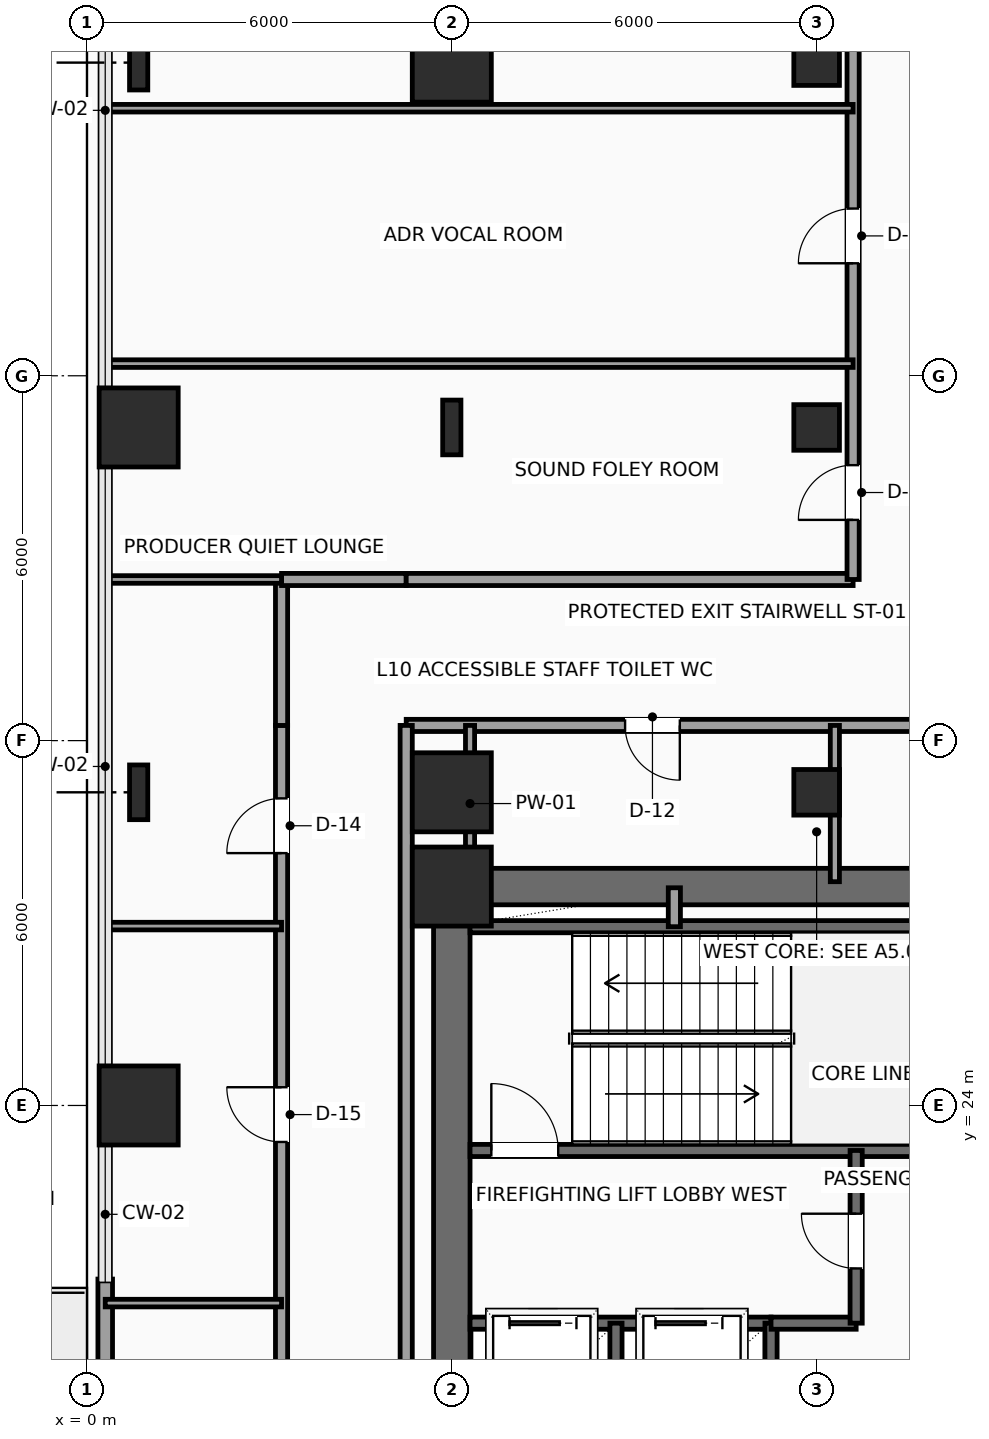
"""IFC4 building model, lengths in metres.
Left out: names, types, materials, properties, quantities, classifications, styles, units other than length and angle.
Written with IfcOpenShell. Run it as: python <this file> out.ifc"""

import sys

from ifc_helpers import new_model, si_unit, direction, frame, frame_2d, origin, origin_2d, place, context, subcontext, project, spatial, rectangle, hollow_rectangle, i_section, extrude, element, fill, save


model = new_model("IFC4")
c1 = context("Model", 3, precision=1e-05, world=origin(), true_north=direction((0.0, 1.0)))
c2 = subcontext(c1, "Body", "Model", "MODEL_VIEW")
j1 = project(units=[si_unit("LENGTHUNIT", "METRE"), si_unit("PLANEANGLEUNIT", "RADIAN")], contexts=[c1])
p1 = place(None, origin())
s1 = spatial("IfcSite", under=j1, at=p1, CompositionType="ELEMENT")
p2 = place(p1, origin())
s2 = spatial("IfcBuilding", under=s1, at=p2, CompositionType="ELEMENT")
p3 = place(p2, frame((0.0, 0.0, 48.0)))
s3 = spatial("IfcBuildingStorey", under=s2, at=p3, CompositionType="ELEMENT", Elevation=48.0)
for number, where, z_axis, x_axis in (
    (1, (6.0, 27.6, 0.0), (0.0, 0.0, 1.0), (1.0, 0.0, 0.0)),
    (2, (0.85, 24.0, 0.0), (0.0, 0.0, 1.0), (1.0, 0.0, 0.0)),
):
    element("IfcColumn", number, at=place(p3, frame(where, z_axis=z_axis, x_axis=x_axis)), inside=s3, PredefinedType="COLUMN", context=c2, shape_type="SweptSolid", body=[
        extrude(rectangle(XDim=1.3, YDim=1.3, at=origin_2d()), origin(), (0.0, 0.0, 1.0), 3.9),
    ])
p4 = place(p3, frame((0.85, 29.15, 0.0), z_axis=(0.0, 0.0, 1.0), x_axis=(1.0, 0.0, 0.0)))
e3 = element("IfcColumn", 3, at=p4, inside=s3, PredefinedType="COLUMN", context=c2, shape_type="SweptSolid", body=[
    extrude(i_section(OverallWidth=0.3, OverallDepth=0.9, WebThickness=0.019, FlangeThickness=0.035, FilletRadius=0.03, at=origin_2d()), origin(), (0.0, 0.0, 1.0), 3.9),
])
p5 = place(p3, frame((0.85, 35.15, 0.0), z_axis=(0.0, 0.0, 1.0), x_axis=(1.0, 0.0, 0.0)))
e4 = element("IfcColumn", 4, at=p5, inside=s3, PredefinedType="COLUMN", context=c2, shape_type="SweptSolid", body=[
    extrude(rectangle(XDim=1.3, YDim=1.3, at=origin_2d()), origin(), (0.0, 0.0, 1.0), 3.9),
])
p6 = place(p3, frame((0.85, 41.15, 0.0), z_axis=(0.0, 0.0, 1.0), x_axis=(1.0, 0.0, 0.0)))
e5 = element("IfcColumn", 5, at=p6, inside=s3, PredefinedType="COLUMN", context=c2, shape_type="SweptSolid", body=[
    extrude(i_section(OverallWidth=0.3, OverallDepth=0.9, WebThickness=0.019, FlangeThickness=0.035, FilletRadius=0.03, at=origin_2d()), origin(), (0.0, 0.0, 1.0), 3.9),
])
p7 = place(p3, frame((6.0, 29.15, 0.0), z_axis=(0.0, 0.0, 1.0), x_axis=(1.0, 0.0, 0.0)))
e6 = element("IfcColumn", 6, at=p7, inside=s3, PredefinedType="COLUMN", context=c2, shape_type="SweptSolid", body=[
    extrude(rectangle(XDim=1.3, YDim=1.3, at=origin_2d()), origin(), (0.0, 0.0, 1.0), 3.9),
])
p8 = place(p3, frame((6.0, 35.15, 0.0), z_axis=(0.0, 0.0, 1.0), x_axis=(1.0, 0.0, 0.0)))
e7 = element("IfcColumn", 7, at=p8, inside=s3, PredefinedType="COLUMN", context=c2, shape_type="SweptSolid", body=[
    extrude(i_section(OverallWidth=0.3, OverallDepth=0.9, WebThickness=0.019, FlangeThickness=0.035, FilletRadius=0.03, at=origin_2d()), origin(), (0.0, 0.0, 1.0), 3.9),
])
p9 = place(p3, frame((6.0, 41.15, 0.0), z_axis=(0.0, 0.0, 1.0), x_axis=(1.0, 0.0, 0.0)))
e8 = element("IfcColumn", 8, at=p9, inside=s3, PredefinedType="COLUMN", context=c2, shape_type="SweptSolid", body=[
    extrude(rectangle(XDim=1.3, YDim=1.3, at=origin_2d()), origin(), (0.0, 0.0, 1.0), 3.9),
])
for number, where, z_axis, x_axis in (
    (9, (12.0, 29.15, 0.0), (0.0, 0.0, 1.0), (1.0, 0.0, 0.0)),
    (10, (12.0, 35.15, 0.0), (0.0, 0.0, 1.0), (1.0, 0.0, 0.0)),
    (11, (12.0, 41.15, 0.0), (0.0, 0.0, 1.0), (1.0, 0.0, 0.0)),
):
    element("IfcColumn", number, at=place(p3, frame(where, z_axis=z_axis, x_axis=x_axis)), inside=s3, PredefinedType="COLUMN", context=c2, shape_type="SweptSolid", body=[
        extrude(hollow_rectangle(XDim=0.75, YDim=0.75, WallThickness=0.035, InnerFilletRadius=0.035, OuterFilletRadius=0.05, at=origin_2d()), origin(), (0.0, 0.0, 1.0), 3.9),
    ])
p10 = place(p3, frame((0.3, 11.855, 0.0), z_axis=(0.0, 0.0, 1.0), x_axis=(0.0, 1.0, 0.0)))
e12 = element("IfcWall", 12, at=p10, inside=s3, PredefinedType="SOLIDWALL", context=c2, shape_type="SweptSolid", body=[
    extrude(rectangle(XDim=9.29, YDim=0.24, at=frame_2d((4.645, 0.0))), origin(), (0.0, 0.0, 1.0), 3.65),
])
p11 = place(p10, frame((3.945, 0.0, 0.0)))
e13 = element("IfcOpeningElement", 13, at=p11, cuts=e12, PredefinedType="OPENING", context=c2, shape_type="SweptSolid", body=[
    extrude(rectangle(XDim=1.05, YDim=2.2, at=frame_2d((0.525, 1.1))), frame((0.0, 0.13, 0.0), z_axis=(0.0, -1.0, 0.0), x_axis=(1.0, 0.0, 0.0)), (0.0, 0.0, 1.0), 0.26),
])
p12 = place(p3, frame((6.0, 27.6, 0.0), z_axis=(0.0, 0.0, 1.0), x_axis=(1.0, 0.0, 0.0)))
e14 = element("IfcWall", 14, at=p12, inside=s3, PredefinedType="SHEAR", context=c2, shape_type="SweptSolid", body=[
    extrude(rectangle(XDim=12.0, YDim=0.6, at=frame_2d((6.0, 0.0))), origin(), (0.0, 0.0, 1.0), 3.65),
])
p13 = place(p12, frame((10.2, 0.0, 0.0)))
e15 = element("IfcOpeningElement", 15, at=p13, cuts=e14, PredefinedType="OPENING", context=c2, shape_type="SweptSolid", body=[
    extrude(rectangle(XDim=0.9, YDim=2.15, at=frame_2d((0.45, 1.075))), frame((0.0, 0.31, 0.0), z_axis=(0.0, -1.0, 0.0), x_axis=(1.0, 0.0, 0.0)), (0.0, 0.0, 1.0), 0.62),
])
p14 = place(p3, frame((6.0, 18.0, 0.0), z_axis=(0.0, 0.0, 1.0), x_axis=(0.0, 1.0, 0.0)))
e16 = element("IfcWall", 16, at=p14, inside=s3, PredefinedType="SHEAR", context=c2, shape_type="SweptSolid", body=[
    extrude(rectangle(XDim=9.6, YDim=0.6, at=frame_2d((4.8, 0.0))), origin(), (0.0, 0.0, 1.0), 3.65),
])
p15 = place(p3, frame((6.3, 23.26, 0.0), z_axis=(0.0, 0.0, 1.0), x_axis=(1.0, 0.0, 0.0)))
e17 = element("IfcWall", 17, at=p15, inside=s3, PredefinedType="SHEAR", context=c2, shape_type="SweptSolid", body=[
    extrude(rectangle(XDim=8.88, YDim=0.2, at=frame_2d((4.44, 0.0))), origin(), (0.0, 0.0, 1.0), 3.65),
])
p16 = place(p15, frame((0.35, 0.0, 0.0)))
e18 = element("IfcOpeningElement", 18, at=p16, cuts=e17, PredefinedType="OPENING", context=c2, shape_type="SweptSolid", body=[
    extrude(rectangle(XDim=1.1, YDim=2.2, at=frame_2d((0.55, 1.1))), frame((0.0, 0.11, 0.0), z_axis=(0.0, -1.0, 0.0), x_axis=(1.0, 0.0, 0.0)), (0.0, 0.0, 1.0), 0.22),
])
p17 = place(p3, frame((6.3, 26.94, 0.0), z_axis=(0.0, 0.0, 1.0), x_axis=(1.0, 0.0, 0.0)))
e19 = element("IfcWall", 19, at=p17, inside=s3, PredefinedType="SHEAR", context=c2, shape_type="SweptSolid", body=[
    extrude(rectangle(XDim=8.88, YDim=0.2, at=frame_2d((4.44, 0.0))), origin(), (0.0, 0.0, 1.0), 3.65),
])
p18 = place(p3, frame((6.3, 20.42, 0.0), z_axis=(0.0, 0.0, 1.0), x_axis=(1.0, 0.0, 0.0)))
e20 = element("IfcWall", 20, at=p18, inside=s3, PredefinedType="SHEAR", context=c2, shape_type="SweptSolid", body=[
    extrude(rectangle(XDim=4.95, YDim=0.2, at=frame_2d((2.475, 0.0))), origin(), (0.0, 0.0, 1.0), 3.65),
])
p19 = place(p18, frame((0.65, 0.0, 0.0)))
e21 = element("IfcOpeningElement", 21, at=p19, cuts=e20, PredefinedType="OPENING", context=c2, shape_type="SweptSolid", body=[
    extrude(rectangle(XDim=1.1, YDim=2.2, at=frame_2d((0.55, 1.1))), frame((0.0, 0.11, 0.0), z_axis=(0.0, -1.0, 0.0), x_axis=(1.0, 0.0, 0.0)), (0.0, 0.0, 1.0), 0.22),
])
p20 = place(p18, frame((3.05, 0.0, 0.0)))
e22 = element("IfcOpeningElement", 22, at=p20, cuts=e20, PredefinedType="OPENING", context=c2, shape_type="SweptSolid", body=[
    extrude(rectangle(XDim=1.1, YDim=2.2, at=frame_2d((0.55, 1.1))), frame((0.0, 0.11, 0.0), z_axis=(0.0, -1.0, 0.0), x_axis=(1.0, 0.0, 0.0)), (0.0, 0.0, 1.0), 0.22),
])
for number, where, z_axis, x_axis in (
    (23, (8.7, 18.25, 0.0), (0.0, 0.0, 1.0), (0.0, 1.0, 0.0)),
    (24, (11.25, 18.25, 0.0), (0.0, 0.0, 1.0), (0.0, 1.0, 0.0)),
):
    element("IfcWall", number, at=place(p3, frame(where, z_axis=z_axis, x_axis=x_axis)), inside=s3, PredefinedType="SHEAR", context=c2, shape_type="SweptSolid", body=[
        extrude(rectangle(XDim=2.17, YDim=0.2, at=frame_2d((1.085, 0.0))), origin(), (0.0, 0.0, 1.0), 3.65),
    ])
p21 = place(p3, frame((11.25, 20.42, 0.0), z_axis=(0.0, 0.0, 1.0), x_axis=(1.0, 0.0, 0.0)))
e25 = element("IfcWall", 25, at=p21, inside=s3, PredefinedType="SHEAR", context=c2, shape_type="SweptSolid", body=[
    extrude(rectangle(XDim=1.4, YDim=0.2, at=frame_2d((0.7, 0.0))), origin(), (0.0, 0.0, 1.0), 3.65),
])
p22 = place(p3, frame((12.65, 20.42, 0.0), z_axis=(0.0, 0.0, 1.0), x_axis=(0.0, 1.0, 0.0)))
e26 = element("IfcWall", 26, at=p22, inside=s3, PredefinedType="SHEAR", context=c2, shape_type="SweptSolid", body=[
    extrude(rectangle(XDim=2.84, YDim=0.2, at=frame_2d((1.42, 0.0))), origin(), (0.0, 0.0, 1.0), 3.65),
])
p23 = place(p22, frame((0.9, 0.0, 0.0)))
e27 = element("IfcOpeningElement", 27, at=p23, cuts=e26, PredefinedType="OPENING", context=c2, shape_type="SweptSolid", body=[
    extrude(rectangle(XDim=0.9, YDim=2.15, at=frame_2d((0.45, 1.075))), frame((0.0, 0.11, 0.0), z_axis=(0.0, -1.0, 0.0), x_axis=(1.0, 0.0, 0.0)), (0.0, 0.0, 1.0), 0.22),
])
p24 = place(p3, frame((9.66, 26.94, 0.0), z_axis=(0.0, 0.0, 1.0), x_axis=(0.0, 1.0, 0.0)))
e28 = element("IfcWall", 28, at=p24, inside=s3, PredefinedType="SOLIDWALL", context=c2, shape_type="SweptSolid", body=[
    extrude(rectangle(XDim=0.64, YDim=0.2, at=frame_2d((0.32, 0.0))), origin(), (0.0, 0.0, 1.0), 3.65),
])
p25 = place(p3, frame((3.2, 14.55, 0.0), z_axis=(0.0, 0.0, 1.0), x_axis=(0.0, 1.0, 0.0)))
e29 = element("IfcWall", 29, at=p25, inside=s3, PredefinedType="PARTITIONING", context=c2, shape_type="SweptSolid", body=[
    extrude(rectangle(XDim=15.7, YDim=0.2, at=frame_2d((7.85, 0.0))), origin(), (0.0, 0.0, 1.0), 3.65),
])
p26 = place(p25, frame((2.65, 0.0, 0.0)))
e30 = element("IfcOpeningElement", 30, at=p26, cuts=e29, PredefinedType="OPENING", context=c2, shape_type="SweptSolid", body=[
    extrude(rectangle(XDim=0.9, YDim=2.1, at=frame_2d((0.45, 1.05))), frame((0.0, 0.11, 0.0), z_axis=(0.0, -1.0, 0.0), x_axis=(1.0, 0.0, 0.0)), (0.0, 0.0, 1.0), 0.22),
])
p27 = place(p25, frame((8.85, 0.0, 0.0)))
e31 = element("IfcOpeningElement", 31, at=p27, cuts=e29, PredefinedType="OPENING", context=c2, shape_type="SweptSolid", body=[
    extrude(rectangle(XDim=0.9, YDim=2.1, at=frame_2d((0.45, 1.05))), frame((0.0, 0.11, 0.0), z_axis=(0.0, -1.0, 0.0), x_axis=(1.0, 0.0, 0.0)), (0.0, 0.0, 1.0), 0.22),
])
p28 = place(p25, frame((13.6, 0.0, 0.0)))
e32 = element("IfcOpeningElement", 32, at=p28, cuts=e29, PredefinedType="OPENING", context=c2, shape_type="SweptSolid", body=[
    extrude(rectangle(XDim=0.9, YDim=2.1, at=frame_2d((0.45, 1.05))), frame((0.0, 0.11, 0.0), z_axis=(0.0, -1.0, 0.0), x_axis=(1.0, 0.0, 0.0)), (0.0, 0.0, 1.0), 0.22),
])
p29 = place(p3, frame((3.2, 30.25, 0.0), z_axis=(0.0, 0.0, 1.0), x_axis=(0.0, 1.0, 0.0)))
e33 = element("IfcWall", 33, at=p29, inside=s3, PredefinedType="PARTITIONING", context=c2, shape_type="SweptSolid", body=[
    extrude(rectangle(XDim=2.4, YDim=0.2, at=frame_2d((1.2, 0.0))), origin(), (0.0, 0.0, 1.0), 3.65),
])
p30 = place(p3, frame((3.2, 32.65, 0.0), z_axis=(0.0, 0.0, 1.0), x_axis=(1.0, 0.0, 0.0)))
e34 = element("IfcWall", 34, at=p30, inside=s3, PredefinedType="PARTITIONING", context=c2, shape_type="SweptSolid", body=[
    extrude(rectangle(XDim=2.05, YDim=0.2, at=frame_2d((1.025, 0.0))), origin(), (0.0, 0.0, 1.0), 3.65),
])
p31 = place(p3, frame((5.25, 32.65, 0.0), z_axis=(0.0, 0.0, 1.0), x_axis=(1.0, 0.0, 0.0)))
e35 = element("IfcWall", 35, at=p31, inside=s3, PredefinedType="PARTITIONING", context=c2, shape_type="SweptSolid", body=[
    extrude(rectangle(XDim=7.35, YDim=0.2, at=frame_2d((3.675, 0.0))), origin(), (0.0, 0.0, 1.0), 3.65),
])
p32 = place(p3, frame((12.6, 32.65, 0.0), z_axis=(0.0, 0.0, 1.0), x_axis=(0.0, 1.0, 0.0)))
e36 = element("IfcWall", 36, at=p32, inside=s3, PredefinedType="PARTITIONING", context=c2, shape_type="SweptSolid", body=[
    extrude(rectangle(XDim=12.25, YDim=0.2, at=frame_2d((6.125, 0.0))), origin(), (0.0, 0.0, 1.0), 3.65),
])
p33 = place(p32, frame((0.98, 0.0, 0.0)))
e37 = element("IfcOpeningElement", 37, at=p33, cuts=e36, PredefinedType="OPENING", context=c2, shape_type="SweptSolid", body=[
    extrude(rectangle(XDim=0.9, YDim=2.1, at=frame_2d((0.45, 1.05))), frame((0.0, 0.11, 0.0), z_axis=(0.0, -1.0, 0.0), x_axis=(1.0, 0.0, 0.0)), (0.0, 0.0, 1.0), 0.22),
])
p34 = place(p32, frame((5.2, 0.0, 0.0)))
e38 = element("IfcOpeningElement", 38, at=p34, cuts=e36, PredefinedType="OPENING", context=c2, shape_type="SweptSolid", body=[
    extrude(rectangle(XDim=0.9, YDim=2.1, at=frame_2d((0.45, 1.05))), frame((0.0, 0.11, 0.0), z_axis=(0.0, -1.0, 0.0), x_axis=(1.0, 0.0, 0.0)), (0.0, 0.0, 1.0), 0.22),
])
p35 = place(p32, frame((9.55, 0.0, 0.0)))
e39 = element("IfcOpeningElement", 39, at=p35, cuts=e36, PredefinedType="OPENING", context=c2, shape_type="SweptSolid", body=[
    extrude(rectangle(XDim=0.9, YDim=2.1, at=frame_2d((0.45, 1.05))), frame((0.0, 0.11, 0.0), z_axis=(0.0, -1.0, 0.0), x_axis=(1.0, 0.0, 0.0)), (0.0, 0.0, 1.0), 0.22),
])
p36 = place(p3, frame((15.88, 30.25, 0.0), z_axis=(0.0, 0.0, 1.0), x_axis=(-1.0, 0.0, 0.0)))
e40 = element("IfcWall", 40, at=p36, inside=s3, PredefinedType="PARTITIONING", context=c2, shape_type="SweptSolid", body=[
    extrude(rectangle(XDim=10.63, YDim=0.2, at=frame_2d((5.315, 0.0))), origin(), (0.0, 0.0, 1.0), 3.65),
])
p37 = place(p36, frame((6.13, 0.0, 0.0)))
e41 = element("IfcOpeningElement", 41, at=p37, cuts=e40, PredefinedType="OPENING", context=c2, shape_type="SweptSolid", body=[
    extrude(rectangle(XDim=0.9, YDim=2.1, at=frame_2d((0.45, 1.05))), frame((0.0, 0.11, 0.0), z_axis=(0.0, -1.0, 0.0), x_axis=(1.0, 0.0, 0.0)), (0.0, 0.0, 1.0), 0.22),
])
p38 = place(p3, frame((5.25, 30.25, 0.0), z_axis=(0.0, 0.0, 1.0), x_axis=(0.0, -1.0, 0.0)))
e42 = element("IfcWall", 42, at=p38, inside=s3, PredefinedType="PARTITIONING", context=c2, shape_type="SweptSolid", body=[
    extrude(rectangle(XDim=13.35, YDim=0.2, at=frame_2d((6.675, 0.0))), origin(), (0.0, 0.0, 1.0), 3.65),
])
for number, where, z_axis, x_axis in (
    (43, (6.3, 27.68, 0.0), (0.0, 0.0, 1.0), (0.0, 1.0, 0.0)),
    (44, (12.3, 27.68, 0.0), (0.0, 0.0, 1.0), (0.0, 1.0, 0.0)),
):
    element("IfcWall", number, at=place(p3, frame(where, z_axis=z_axis, x_axis=x_axis)), inside=s3, PredefinedType="PARTITIONING", context=c2, shape_type="SweptSolid", body=[
        extrude(rectangle(XDim=2.57, YDim=0.15, at=frame_2d((1.285, 0.0))), origin(), (0.0, 0.0, 1.0), 2.992),
    ])
for number, where, z_axis, x_axis in (
    (45, (0.3, 36.2, 0.0), (0.0, 0.0, 1.0), (1.0, 0.0, 0.0)),
    (46, (0.3, 40.4, 0.0), (0.0, 0.0, 1.0), (1.0, 0.0, 0.0)),
):
    element("IfcWall", number, at=place(p3, frame(where, z_axis=z_axis, x_axis=x_axis)), inside=s3, PredefinedType="PARTITIONING", context=c2, shape_type="SweptSolid", body=[
        extrude(rectangle(XDim=12.3, YDim=0.125, at=frame_2d((6.15, 0.0))), origin(), (0.0, 0.0, 1.0), 3.65),
    ])
p39 = place(p3, frame((0.3, 40.4, 0.0), z_axis=(0.0, 0.0, 1.0), x_axis=(0.006903122154, 0.999976173168, 0.0)))
e47 = element("IfcWall", 47, at=p39, inside=s3, PredefinedType="PARTITIONING", context=c2, shape_type="SweptSolid", body=[
    extrude(rectangle(XDim=7.25, YDim=0.125, at=frame_2d((3.625, 0.0))), origin(), (0.0, 0.0, 1.0), 3.65),
])
for number, where, z_axis, x_axis in (
    (48, (0.3, 20.75, 0.0), (0.0, 0.0, 1.0), (1.0, 0.0, 0.0)),
    (49, (0.3, 26.95, 0.0), (0.0, 0.0, 1.0), (1.0, 0.0, 0.0)),
    (50, (0.3, 32.65, 0.0), (0.0, 0.0, 1.0), (1.0, 0.0, 0.0)),
):
    element("IfcWall", number, at=place(p3, frame(where, z_axis=z_axis, x_axis=x_axis)), inside=s3, PredefinedType="PARTITIONING", context=c2, shape_type="SweptSolid", body=[
        extrude(rectangle(XDim=2.9, YDim=0.125, at=frame_2d((1.45, 0.0))), origin(), (0.0, 0.0, 1.0), 3.65),
    ])
p40 = place(p16, origin())
e51 = element("IfcDoor", 51, at=p40, inside=s3, OperationType="SINGLE_SWING_LEFT", PredefinedType="DOOR", context=c2, shape_type="SweptSolid", body=[
    extrude(rectangle(XDim=1.1, YDim=2.2, at=frame_2d((0.55, 1.1))), frame((0.0, 0.025, 0.0), z_axis=(0.0, -1.0, 0.0), x_axis=(1.0, 0.0, 0.0)), (0.0, 0.0, 1.0), 0.05),
])
fill(e18, e51)
p41 = place(p19, origin())
e52 = element("IfcDoor", 52, at=p41, inside=s3, OperationType="SLIDING_TO_LEFT", PredefinedType="DOOR", context=c2, shape_type="SweptSolid", body=[
    extrude(rectangle(XDim=1.1, YDim=2.2, at=frame_2d((0.55, 1.1))), frame((0.0, 0.025, 0.0), z_axis=(0.0, -1.0, 0.0), x_axis=(1.0, 0.0, 0.0)), (0.0, 0.0, 1.0), 0.05),
])
fill(e21, e52)
p42 = place(p20, origin())
e53 = element("IfcDoor", 53, at=p42, inside=s3, OperationType="SLIDING_TO_LEFT", PredefinedType="DOOR", context=c2, shape_type="SweptSolid", body=[
    extrude(rectangle(XDim=1.1, YDim=2.2, at=frame_2d((0.55, 1.1))), frame((0.0, 0.025, 0.0), z_axis=(0.0, -1.0, 0.0), x_axis=(1.0, 0.0, 0.0)), (0.0, 0.0, 1.0), 0.05),
])
fill(e22, e53)
p43 = place(p23, origin())
e54 = element("IfcDoor", 54, at=p43, inside=s3, OperationType="SINGLE_SWING_RIGHT", PredefinedType="DOOR", context=c2, shape_type="SweptSolid", body=[
    extrude(rectangle(XDim=0.9, YDim=2.15, at=frame_2d((0.45, 1.075))), frame((0.0, 0.025, 0.0), z_axis=(0.0, -1.0, 0.0), x_axis=(1.0, 0.0, 0.0)), (0.0, 0.0, 1.0), 0.05),
])
fill(e27, e54)
p44 = place(p27, origin())
e55 = element("IfcDoor", 55, at=p44, inside=s3, OperationType="SINGLE_SWING_RIGHT", PredefinedType="DOOR", context=c2, shape_type="SweptSolid", body=[
    extrude(rectangle(XDim=0.9, YDim=2.1, at=frame_2d((0.45, 1.05))), frame((0.0, 0.025, 0.0), z_axis=(0.0, -1.0, 0.0), x_axis=(1.0, 0.0, 0.0)), (0.0, 0.0, 1.0), 0.05),
])
fill(e31, e55)
p45 = place(p28, origin())
e56 = element("IfcDoor", 56, at=p45, inside=s3, OperationType="SINGLE_SWING_LEFT", PredefinedType="DOOR", context=c2, shape_type="SweptSolid", body=[
    extrude(rectangle(XDim=0.9, YDim=2.1, at=frame_2d((0.45, 1.05))), frame((0.0, 0.025, 0.0), z_axis=(0.0, -1.0, 0.0), x_axis=(1.0, 0.0, 0.0)), (0.0, 0.0, 1.0), 0.05),
])
fill(e32, e56)
p46 = place(p33, origin())
e57 = element("IfcDoor", 57, at=p46, inside=s3, OperationType="SINGLE_SWING_LEFT", PredefinedType="DOOR", context=c2, shape_type="SweptSolid", body=[
    extrude(rectangle(XDim=0.9, YDim=2.1, at=frame_2d((0.45, 1.05))), frame((0.0, 0.025, 0.0), z_axis=(0.0, -1.0, 0.0), x_axis=(1.0, 0.0, 0.0)), (0.0, 0.0, 1.0), 0.05),
])
fill(e37, e57)
p47 = place(p34, origin())
e58 = element("IfcDoor", 58, at=p47, inside=s3, OperationType="SINGLE_SWING_LEFT", PredefinedType="DOOR", context=c2, shape_type="SweptSolid", body=[
    extrude(rectangle(XDim=0.9, YDim=2.1, at=frame_2d((0.45, 1.05))), frame((0.0, 0.025, 0.0), z_axis=(0.0, -1.0, 0.0), x_axis=(1.0, 0.0, 0.0)), (0.0, 0.0, 1.0), 0.05),
])
fill(e38, e58)
p48 = place(p37, origin())
e59 = element("IfcDoor", 59, at=p48, inside=s3, OperationType="SINGLE_SWING_LEFT", PredefinedType="DOOR", context=c2, shape_type="SweptSolid", body=[
    extrude(rectangle(XDim=0.9, YDim=2.1, at=frame_2d((0.45, 1.05))), frame((0.0, 0.025, 0.0), z_axis=(0.0, -1.0, 0.0), x_axis=(1.0, 0.0, 0.0)), (0.0, 0.0, 1.0), 0.05),
])
fill(e41, e59)
save(model, sys.argv[1])
